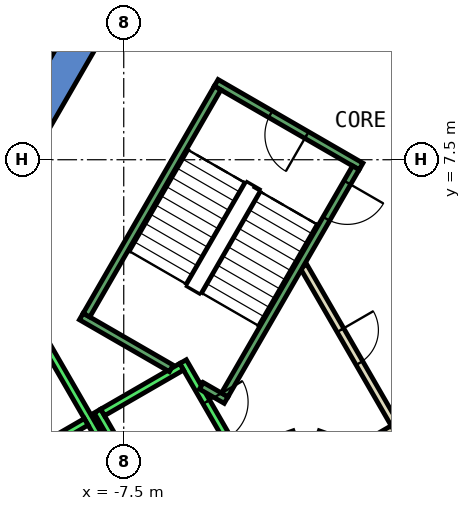
"""IFC4 building model, lengths in metres.
Left out: names, types, materials, properties, quantities, classifications, styles, units other than length and angle.
Written with IfcOpenShell. Run it as: python <this file> out.ifc"""

import sys

from ifc_helpers import new_model, si_unit, direction, frame, frame_2d, origin, place, context, subcontext, project, spatial, polyline, rectangle, outline, extrude, element, fill, save


model = new_model("IFC4")
c1 = context("Model", 3, precision=1e-05, world=origin(), true_north=direction((0.0, 1.0)))
c2 = subcontext(c1, "Body", "Model", "MODEL_VIEW")
j1 = project(units=[si_unit("LENGTHUNIT", "METRE"), si_unit("PLANEANGLEUNIT", "RADIAN")], contexts=[c1])
p1 = place(None, origin())
s1 = spatial("IfcSite", under=j1, at=p1, CompositionType="ELEMENT")
p2 = place(p1, origin())
s2 = spatial("IfcBuilding", under=s1, at=p2, CompositionType="ELEMENT")
p3 = place(p2, frame((0.0, 0.0, 107.6)))
s3 = spatial("IfcBuildingStorey", under=s2, at=p3, CompositionType="ELEMENT", Elevation=107.6)
p4 = place(p3, frame((0.0, 0.0, -0.4)))
e1 = element("IfcWall", 1, at=p4, inside=s3, PredefinedType="SHEAR", context=c2, shape_type="SweptSolid", body=[
    extrude(outline(polyline([(-12.267, 5.252), (-11.488, 4.802), (-6.409, 13.6), (-6.928, 14.5), (-12.267, 5.252)])), origin(), (0.0, 0.0, 1.0), 4.2),
])
p5 = place(p3, frame((0.0, 0.0, -0.4)))
e2 = element("IfcWall", 2, at=p5, inside=s3, PredefinedType="SHEAR", context=c2, shape_type="SweptSolid", body=[
    extrude(outline(polyline([(-13.856, 2.5), (-6.928, -9.5), (-6.409, -8.6), (-12.817, 2.5), (-13.856, 2.5)])), origin(), (0.0, 0.0, 1.0), 4.2),
])
p6 = place(p3, frame((-0.52, -1.0, 0.0), z_axis=(0.0, 0.0, 1.0), x_axis=(0.50011622646, 0.865958290007, 0.0)))
e3 = element("IfcWall", 3, at=p6, inside=s3, PredefinedType="PARTITIONING", context=c2, shape_type="SweptSolid", body=[
    extrude(rectangle(XDim=4.991, YDim=0.2, at=frame_2d((2.496, 0.0))), origin(), (0.0, 0.0, 1.0), 3.8),
])
p7 = place(p6, frame((1.945, 0.0, 0.0)))
e4 = element("IfcOpeningElement", 4, at=p7, cuts=e3, PredefinedType="OPENING", context=c2, shape_type="SweptSolid", body=[
    extrude(rectangle(XDim=1.0, YDim=2.1, at=frame_2d((0.5, 1.05))), frame((0.0, 0.11, 0.0), z_axis=(0.0, -1.0, 0.0), x_axis=(1.0, 0.0, 0.0)), (0.0, 0.0, 1.0), 0.22),
])
p8 = place(p3, frame((-2.771, 4.7, 0.0), z_axis=(0.0, 0.0, 1.0), x_axis=(0.499969479948, -0.866043023828, 0.0)))
e5 = element("IfcWall", 5, at=p8, inside=s3, PredefinedType="PARTITIONING", context=c2, shape_type="SweptSolid", body=[
    extrude(rectangle(XDim=4.99, YDim=0.2, at=frame_2d((2.495, 0.0))), origin(), (0.0, 0.0, 1.0), 3.8),
])
p9 = place(p8, frame((1.945, 0.0, 0.0)))
e6 = element("IfcOpeningElement", 6, at=p9, cuts=e5, PredefinedType="OPENING", context=c2, shape_type="SweptSolid", body=[
    extrude(rectangle(XDim=1.0, YDim=2.1, at=frame_2d((0.5, 1.05))), frame((0.0, 0.11, 0.0), z_axis=(0.0, -1.0, 0.0), x_axis=(1.0, 0.0, 0.0)), (0.0, 0.0, 1.0), 0.22),
])
p10 = place(p3, frame((-0.412, 0.414, 0.0), z_axis=(0.0, 0.0, 1.0), x_axis=(-0.866017369001, -0.500013916395, 0.0)))
e7 = element("IfcWall", 7, at=p10, inside=s3, PredefinedType="PARTITIONING", context=c2, shape_type="SweptSolid", body=[
    extrude(rectangle(XDim=1.45, YDim=0.2, at=frame_2d((0.725, 0.0))), origin(), (0.0, 0.0, 1.0), 3.8),
])
p11 = place(p3, frame((-2.07, 0.16, 0.0), z_axis=(0.0, 0.0, 1.0), x_axis=(-0.942199461132, 0.335052496547, 0.0)))
e8 = element("IfcWall", 8, at=p11, inside=s3, PredefinedType="PARTITIONING", context=c2, shape_type="SweptSolid", body=[
    extrude(rectangle(XDim=0.337, YDim=0.2, at=frame_2d((0.169, 0.0))), origin(), (0.0, 0.0, 1.0), 3.8),
])
p12 = place(p3, frame((-3.012, 0.273, 0.0), z_axis=(0.0, 0.0, 1.0), x_axis=(-0.942280615813, -0.334824194261, 0.0)))
e9 = element("IfcWall", 9, at=p12, inside=s3, PredefinedType="PARTITIONING", context=c2, shape_type="SweptSolid", body=[
    extrude(rectangle(XDim=0.338, YDim=0.2, at=frame_2d((0.169, 0.0))), origin(), (0.0, 0.0, 1.0), 3.8),
])
p13 = place(p3, frame((-5.94, 2.188, 0.0), z_axis=(0.0, 0.0, 1.0), x_axis=(0.49994636267, -0.866056369097, 0.0)))
e10 = element("IfcWall", 10, at=p13, inside=s3, PredefinedType="STANDARD", context=c2, shape_type="SweptSolid", body=[
    extrude(rectangle(XDim=2.8, YDim=0.2, at=frame_2d((1.4, 0.0))), origin(), (0.0, 0.0, 1.0), 3.8),
])
p14 = place(p13, frame((1.225, 0.0, 0.0)))
e11 = element("IfcOpeningElement", 11, at=p14, cuts=e10, PredefinedType="OPENING", context=c2, shape_type="SweptSolid", body=[
    extrude(rectangle(XDim=1.1, YDim=2.1, at=frame_2d((0.55, 1.05))), frame((0.0, 0.11, 0.0), z_axis=(0.0, -1.0, 0.0), x_axis=(1.0, 0.0, 0.0)), (0.0, 0.0, 1.0), 0.22),
])
p15 = place(p3, frame((-8.192, 0.888, 0.0), z_axis=(0.0, 0.0, 1.0), x_axis=(0.49994636267, -0.866056369097, 0.0)))
e12 = element("IfcWall", 12, at=p15, inside=s3, PredefinedType="STANDARD", context=c2, shape_type="SweptSolid", body=[
    extrude(rectangle(XDim=2.8, YDim=0.2, at=frame_2d((1.4, 0.0))), origin(), (0.0, 0.0, 1.0), 3.8),
])
p16 = place(p3, frame((-5.977, 2.052, 0.0), z_axis=(0.0, 0.0, 1.0), x_axis=(-0.865973769406, -0.500089422704, 0.0)))
e13 = element("IfcWall", 13, at=p16, inside=s3, PredefinedType="STANDARD", context=c2, shape_type="SweptSolid", body=[
    extrude(rectangle(XDim=2.399, YDim=0.2, at=frame_2d((1.2, 0.0))), origin(), (0.0, 0.0, 1.0), 3.8),
])
p17 = place(p3, frame((-9.751, 2.99, 0.0), z_axis=(0.0, 0.0, 1.0), x_axis=(0.50000090737, -0.866024879913, 0.0)))
e14 = element("IfcWall", 14, at=p17, inside=s3, PredefinedType="STANDARD", context=c2, shape_type="SweptSolid", body=[
    extrude(rectangle(XDim=10.6, YDim=0.2, at=frame_2d((5.3, 0.0))), origin(), (0.0, 0.0, 1.0), 3.8),
])
p18 = place(p3, frame((-8.488, 0.602, 0.0), z_axis=(0.0, 0.0, 1.0), x_axis=(-0.866022959057, -0.500004234368, 0.0)))
e15 = element("IfcWall", 15, at=p18, inside=s3, PredefinedType="STANDARD", context=c2, shape_type="SweptSolid", body=[
    extrude(rectangle(XDim=2.5, YDim=0.2, at=frame_2d((1.25, 0.0))), origin(), (0.0, 0.0, 1.0), 3.8),
])
p19 = place(p3, frame((-1.256, 7.324, 0.0), z_axis=(0.0, 0.0, 1.0), x_axis=(-0.866046073146, 0.499964197906, 0.0)))
e16 = element("IfcWall", 16, at=p19, inside=s3, PredefinedType="STANDARD", context=c2, shape_type="SweptSolid", body=[
    extrude(rectangle(XDim=4.4, YDim=0.2, at=frame_2d((2.2, 0.0))), origin(), (0.0, 0.0, 1.0), 3.8),
])
p20 = place(p19, frame((1.65, 0.0, 0.0)))
e17 = element("IfcOpeningElement", 17, at=p20, cuts=e16, PredefinedType="OPENING", context=c2, shape_type="SweptSolid", body=[
    extrude(rectangle(XDim=1.1, YDim=2.2, at=frame_2d((0.55, 1.1))), frame((0.0, 0.11, 0.0), z_axis=(0.0, -1.0, 0.0), x_axis=(1.0, 0.0, 0.0)), (0.0, 0.0, 1.0), 0.22),
])
p21 = place(p3, frame((-6.25, 2.01, 0.0), z_axis=(0.0, 0.0, 1.0), x_axis=(-0.86611865017, 0.499838457731, 0.0)))
e18 = element("IfcWall", 18, at=p21, inside=s3, PredefinedType="STANDARD", context=c2, shape_type="SweptSolid", body=[
    extrude(rectangle(XDim=2.733, YDim=0.2, at=frame_2d((1.366, 0.0))), origin(), (0.0, 0.0, 1.0), 3.8),
])
p22 = place(p3, frame((-4.806, 1.176, 0.0), z_axis=(0.0, 0.0, 1.0), x_axis=(-0.866558586415, 0.499075361355, 0.0)))
e19 = element("IfcWall", 19, at=p22, inside=s3, PredefinedType="STANDARD", context=c2, shape_type="SweptSolid", body=[
    extrude(rectangle(XDim=0.751, YDim=0.2, at=frame_2d((0.376, 0.0))), origin(), (0.0, 0.0, 1.0), 3.8),
])
p23 = place(p3, frame((-1.393, 7.288, 0.0), z_axis=(0.0, 0.0, 1.0), x_axis=(-0.499963383562, -0.866046543262, 0.0)))
e20 = element("IfcWall", 20, at=p23, inside=s3, PredefinedType="STANDARD", context=c2, shape_type="SweptSolid", body=[
    extrude(rectangle(XDim=6.9, YDim=0.2, at=frame_2d((3.45, 0.0))), origin(), (0.0, 0.0, 1.0), 3.8),
])
p24 = place(p23, frame((0.45, 0.0, 0.0)))
e21 = element("IfcOpeningElement", 21, at=p24, cuts=e20, PredefinedType="OPENING", context=c2, shape_type="SweptSolid", body=[
    extrude(rectangle(XDim=1.1, YDim=2.2, at=frame_2d((0.55, 1.1))), frame((0.0, 0.11, 0.0), z_axis=(0.0, -1.0, 0.0), x_axis=(1.0, 0.0, 0.0)), (0.0, 0.0, 1.0), 0.22),
])
p25 = place(p3, frame((-5.03, 9.388, 0.0), z_axis=(0.0, 0.0, 1.0), x_axis=(-0.499978703459, -0.866037698999, 0.0)))
e22 = element("IfcWall", 22, at=p25, inside=s3, PredefinedType="STANDARD", context=c2, shape_type="SweptSolid", body=[
    extrude(rectangle(XDim=6.9, YDim=0.2, at=frame_2d((3.45, 0.0))), origin(), (0.0, 0.0, 1.0), 3.8),
])
p26 = place(p9, origin())
e23 = element("IfcDoor", 23, at=p26, inside=s3, OperationType="SINGLE_SWING_RIGHT", PredefinedType="DOOR", context=c2, shape_type="SweptSolid", body=[
    extrude(rectangle(XDim=1.0, YDim=2.1, at=frame_2d((0.5, 1.05))), frame((0.0, 0.025, 0.0), z_axis=(0.0, -1.0, 0.0), x_axis=(1.0, 0.0, 0.0)), (0.0, 0.0, 1.0), 0.05),
])
fill(e6, e23)
p27 = place(p14, origin())
e24 = element("IfcDoor", 24, at=p27, inside=s3, OperationType="SLIDING_TO_LEFT", PredefinedType="DOOR", context=c2, shape_type="SweptSolid", body=[
    extrude(rectangle(XDim=1.1, YDim=2.1, at=frame_2d((0.55, 1.05))), frame((0.0, 0.025, 0.0), z_axis=(0.0, -1.0, 0.0), x_axis=(1.0, 0.0, 0.0)), (0.0, 0.0, 1.0), 0.05),
])
fill(e11, e24)
p28 = place(p24, origin())
e25 = element("IfcDoor", 25, at=p28, inside=s3, OperationType="SINGLE_SWING_LEFT", PredefinedType="DOOR", context=c2, shape_type="SweptSolid", body=[
    extrude(rectangle(XDim=1.1, YDim=2.2, at=frame_2d((0.55, 1.1))), frame((0.0, 0.025, 0.0), z_axis=(0.0, -1.0, 0.0), x_axis=(1.0, 0.0, 0.0)), (0.0, 0.0, 1.0), 0.05),
])
fill(e21, e25)
p29 = place(p20, origin())
e26 = element("IfcDoor", 26, at=p29, inside=s3, OperationType="SINGLE_SWING_LEFT", PredefinedType="DOOR", context=c2, shape_type="SweptSolid", body=[
    extrude(rectangle(XDim=1.1, YDim=2.2, at=frame_2d((0.55, 1.1))), frame((0.0, 0.025, 0.0), z_axis=(0.0, -1.0, 0.0), x_axis=(1.0, 0.0, 0.0)), (0.0, 0.0, 1.0), 0.05),
])
fill(e17, e26)
save(model, sys.argv[1])
